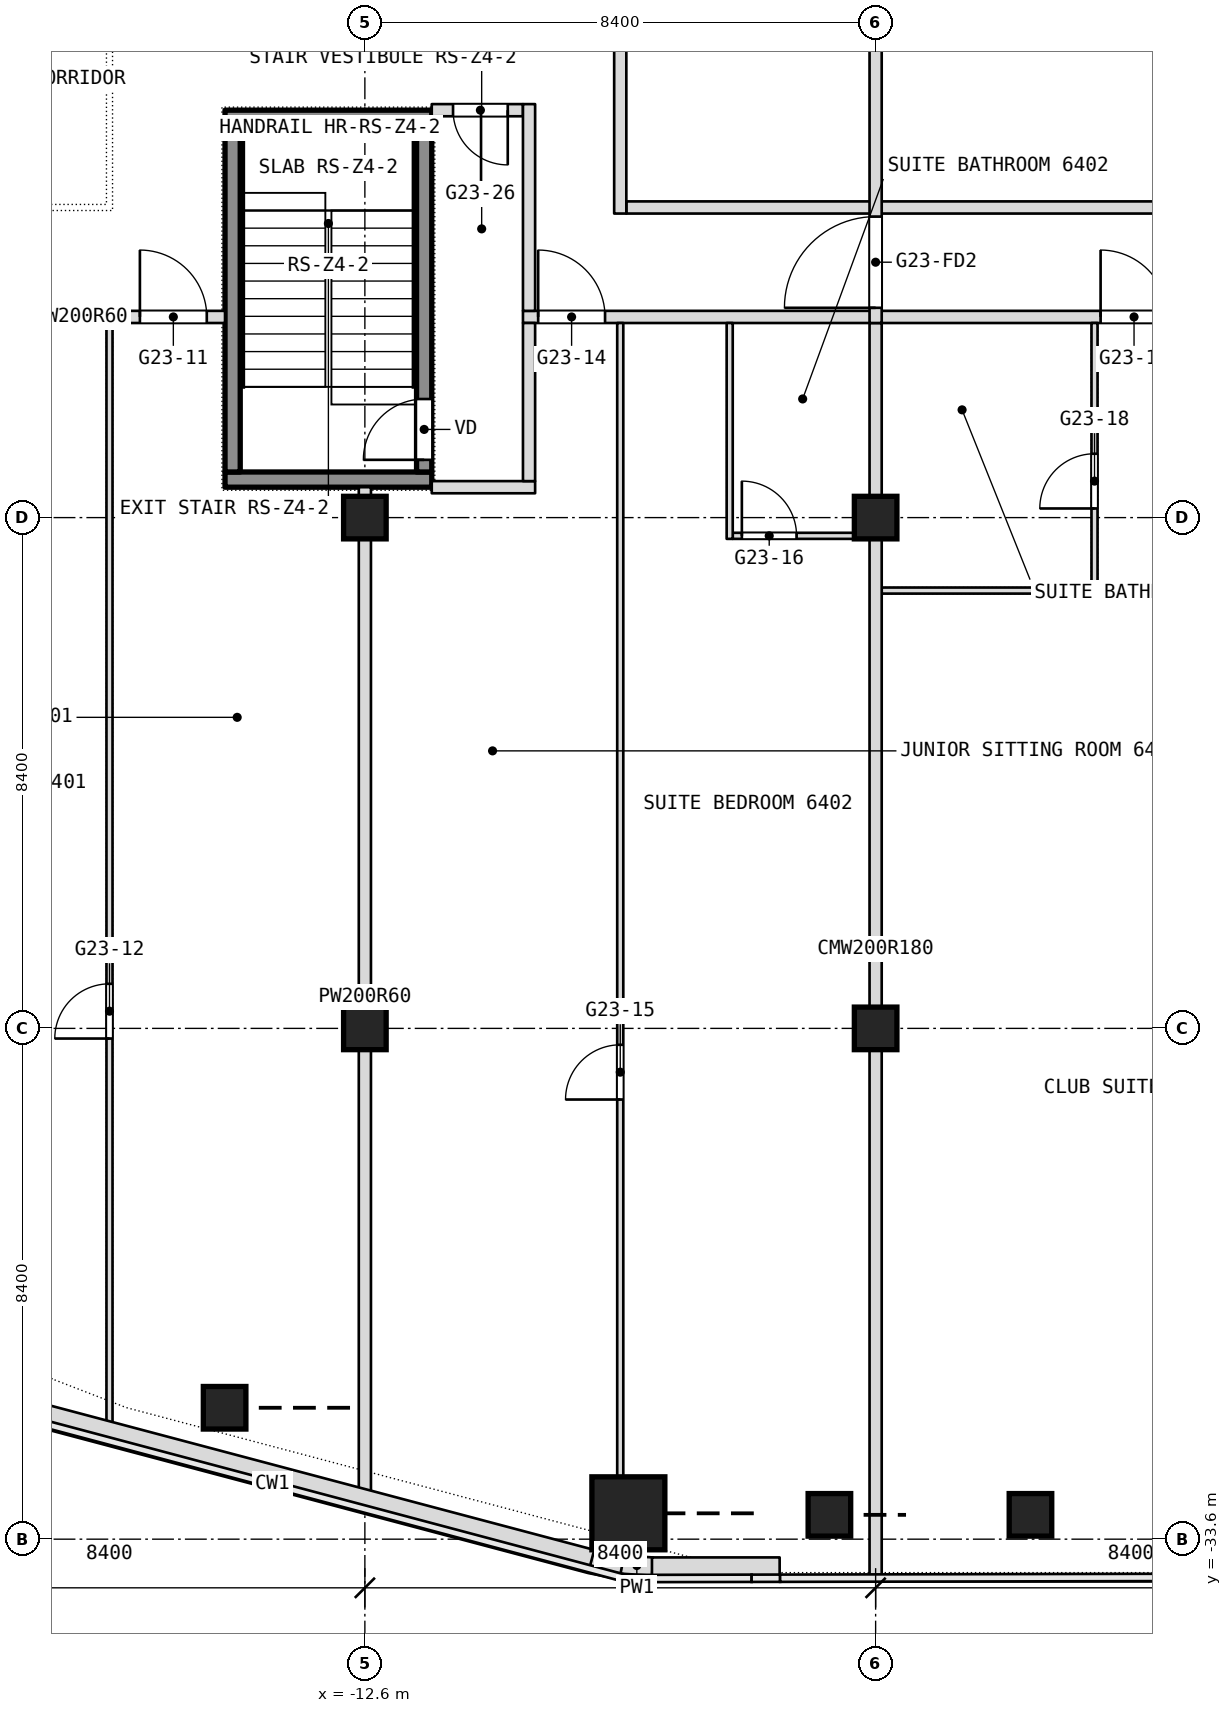
"""IFC4 building model, lengths in metres.
Left out: names, types, materials, properties, quantities, classifications, styles, units other than length and angle.
Written with IfcOpenShell. Run it as: python <this file> out.ifc"""

import sys

from ifc_helpers import new_model, si_unit, direction, frame, frame_2d, origin, origin_2d, place, context, subcontext, project, spatial, rectangle, i_section, extrude, element, fill, save


model = new_model("IFC4")
c1 = context("Model", 3, precision=1e-05, world=origin(), true_north=direction((0.0, 1.0)))
c2 = subcontext(c1, "Body", "Model", "MODEL_VIEW")
j1 = project(units=[si_unit("LENGTHUNIT", "METRE"), si_unit("PLANEANGLEUNIT", "RADIAN")], contexts=[c1])
p1 = place(None, origin())
s1 = spatial("IfcSite", under=j1, at=p1, CompositionType="ELEMENT")
p2 = place(p1, origin())
s2 = spatial("IfcBuilding", under=s1, at=p2, CompositionType="ELEMENT")
p3 = place(p2, frame((0.0, 0.0, 277.7)))
s3 = spatial("IfcBuildingStorey", under=s2, at=p3, CompositionType="ELEMENT", Elevation=277.7)
for number, where, z_axis, x_axis in (
    (1, (-12.6, -25.2, 0.0), (0.0, 0.0, 1.0), (1.0, 0.0, 0.0)),
    (2, (-12.6, -16.8, 0.0), (0.0, 0.0, 1.0), (1.0, 0.0, 0.0)),
    (3, (-4.2, -25.2, 0.0), (0.0, 0.0, 1.0), (1.0, 0.0, 0.0)),
    (4, (-4.2, -16.8, 0.0), (0.0, 0.0, 1.0), (1.0, 0.0, 0.0)),
):
    element("IfcColumn", number, at=place(p3, frame(where, z_axis=z_axis, x_axis=x_axis)), inside=s3, PredefinedType="COLUMN", context=c2, shape_type="SweptSolid", body=[
        extrude(rectangle(XDim=0.7, YDim=0.7, at=origin_2d()), origin(), (0.0, 0.0, 1.0), 3.6),
    ])
for number, where, z_axis, x_axis in (
    (5, (-8.679, -33.091, 0.0), (0.0, 0.0, 1.0), (1.0, 0.0, 0.0)),
    (6, (-14.907, -31.439, 0.0), (0.0, 0.0, 1.0), (1.0, 0.0, 0.0)),
):
    element("IfcColumn", number, at=place(p3, frame(where, z_axis=z_axis, x_axis=x_axis)), inside=s3, PredefinedType="COLUMN", context=c2, shape_type="SweptSolid", body=[
        extrude(i_section(OverallWidth=0.306, OverallDepth=0.524, WebThickness=0.024, FlangeThickness=0.04, FilletRadius=0.027, at=origin_2d()), origin(), (0.0, 0.0, 1.0), 2.94),
    ])
p4 = place(p3, frame((-4.1, -18.0, 0.0), z_axis=(0.0, 0.0, 1.0), x_axis=(1.0, 0.0, 0.0)))
e7 = element("IfcWall", 7, at=p4, inside=s3, PredefinedType="PARTITIONING", context=c2, shape_type="SweptSolid", body=[
    extrude(rectangle(XDim=3.55, YDim=0.1, at=frame_2d((1.775, 0.0))), origin(), (0.0, 0.0, 1.0), 3.34),
])
p5 = place(p3, frame((-6.55, -17.1, 0.0), z_axis=(0.0, 0.0, 1.0), x_axis=(1.0, 0.0, 0.0)))
e8 = element("IfcWall", 8, at=p5, inside=s3, PredefinedType="PARTITIONING", context=c2, shape_type="SweptSolid", body=[
    extrude(rectangle(XDim=2.45, YDim=0.1, at=frame_2d((1.225, 0.0))), origin(), (0.0, 0.0, 1.0), 3.34),
])
p6 = place(p5, frame((0.15, 0.0, 0.0)))
e9 = element("IfcOpeningElement", 9, at=p6, cuts=e8, PredefinedType="OPENING", context=c2, shape_type="SweptSolid", body=[
    extrude(rectangle(XDim=0.9, YDim=2.1, at=frame_2d((0.45, 1.05))), frame((0.0, 0.05, 0.0), z_axis=(0.0, -1.0, 0.0), x_axis=(1.0, 0.0, 0.0)), (0.0, 0.0, 1.0), 0.1),
])
p7 = place(p3, frame((-11.5, -16.3, 0.0), z_axis=(0.0, 0.0, 1.0), x_axis=(1.0, 0.0, 0.0)))
e10 = element("IfcWall", 10, at=p7, inside=s3, PredefinedType="PARTITIONING", context=c2, shape_type="SweptSolid", body=[
    extrude(rectangle(XDim=1.7, YDim=0.2, at=frame_2d((0.85, 0.0))), origin(), (0.0, 0.0, 1.0), 3.34),
])
p8 = place(p3, frame((-21.0, -13.5, 0.0), z_axis=(0.0, 0.0, 1.0), x_axis=(1.0, 0.0, 0.0)))
e11 = element("IfcWall", 11, at=p8, inside=s3, PredefinedType="PARTITIONING", context=c2, shape_type="SweptSolid", body=[
    extrude(rectangle(XDim=6.1, YDim=0.2, at=frame_2d((3.05, 0.0))), origin(), (0.0, 0.0, 1.0), 3.34),
])
p9 = place(p8, frame((4.7, 0.0, 0.0)))
e12 = element("IfcOpeningElement", 12, at=p9, cuts=e11, PredefinedType="OPENING", context=c2, shape_type="SweptSolid", body=[
    extrude(rectangle(XDim=1.1, YDim=2.1, at=frame_2d((0.55, 1.05))), frame((0.0, 0.1, 0.0), z_axis=(0.0, -1.0, 0.0), x_axis=(1.0, 0.0, 0.0)), (0.0, 0.0, 1.0), 0.2),
])
p10 = place(p3, frame((-10.0, -13.5, 0.0), z_axis=(0.0, 0.0, 1.0), x_axis=(1.0, 0.0, 0.0)))
e13 = element("IfcWall", 13, at=p10, inside=s3, PredefinedType="PARTITIONING", context=c2, shape_type="SweptSolid", body=[
    extrude(rectangle(XDim=16.0, YDim=0.2, at=frame_2d((8.0, 0.0))), origin(), (0.0, 0.0, 1.0), 3.34),
])
p11 = place(p10, frame((0.25, 0.0, 0.0)))
e14 = element("IfcOpeningElement", 14, at=p11, cuts=e13, PredefinedType="OPENING", context=c2, shape_type="SweptSolid", body=[
    extrude(rectangle(XDim=1.1, YDim=2.1, at=frame_2d((0.55, 1.05))), frame((0.0, 0.1, 0.0), z_axis=(0.0, -1.0, 0.0), x_axis=(1.0, 0.0, 0.0)), (0.0, 0.0, 1.0), 0.2),
])
p12 = place(p10, frame((9.5, 0.0, 0.0)))
e15 = element("IfcOpeningElement", 15, at=p12, cuts=e13, PredefinedType="OPENING", context=c2, shape_type="SweptSolid", body=[
    extrude(rectangle(XDim=1.1, YDim=2.1, at=frame_2d((0.55, 1.05))), frame((0.0, 0.1, 0.0), z_axis=(0.0, -1.0, 0.0), x_axis=(1.0, 0.0, 0.0)), (0.0, 0.0, 1.0), 0.2),
])
p13 = place(p3, frame((-8.3, -11.7, 0.0), z_axis=(0.0, 0.0, 1.0), x_axis=(1.0, 0.0, 0.0)))
e16 = element("IfcWall", 16, at=p13, inside=s3, PredefinedType="PARTITIONING", context=c2, shape_type="SweptSolid", body=[
    extrude(rectangle(XDim=25.0, YDim=0.2, at=frame_2d((12.5, 0.0))), origin(), (0.0, 0.0, 1.0), 3.34),
])
p14 = place(p3, frame((-11.5, -10.1, 0.0), z_axis=(0.0, 0.0, 1.0), x_axis=(1.0, 0.0, 0.0)))
e17 = element("IfcWall", 17, at=p14, inside=s3, PredefinedType="PARTITIONING", context=c2, shape_type="SweptSolid", body=[
    extrude(rectangle(XDim=1.5, YDim=0.2, at=frame_2d((0.75, 0.0))), origin(), (0.0, 0.0, 1.0), 3.34),
])
p15 = place(p14, frame((0.35, 0.0, 0.0)))
e18 = element("IfcOpeningElement", 18, at=p15, cuts=e17, PredefinedType="OPENING", context=c2, shape_type="SweptSolid", body=[
    extrude(rectangle(XDim=0.9, YDim=2.1, at=frame_2d((0.45, 1.05))), frame((0.0, 0.1, 0.0), z_axis=(0.0, -1.0, 0.0), x_axis=(1.0, 0.0, 0.0)), (0.0, 0.0, 1.0), 0.2),
])
p16 = place(p3, frame((-0.6, -17.95, 0.0), z_axis=(0.0, 0.0, 1.0), x_axis=(0.0, 1.0, 0.0)))
e19 = element("IfcWall", 19, at=p16, inside=s3, PredefinedType="PARTITIONING", context=c2, shape_type="SweptSolid", body=[
    extrude(rectangle(XDim=4.35, YDim=0.1, at=frame_2d((2.175, 0.0))), origin(), (0.0, 0.0, 1.0), 3.34),
])
p17 = place(p16, frame((1.3, 0.0, 0.0)))
e20 = element("IfcOpeningElement", 20, at=p17, cuts=e19, PredefinedType="OPENING", context=c2, shape_type="SweptSolid", body=[
    extrude(rectangle(XDim=0.9, YDim=2.1, at=frame_2d((0.45, 1.05))), frame((0.0, 0.05, 0.0), z_axis=(0.0, -1.0, 0.0), x_axis=(1.0, 0.0, 0.0)), (0.0, 0.0, 1.0), 0.1),
])
p18 = place(p3, frame((-4.2, -34.2, 0.0), z_axis=(0.0, 0.0, 1.0), x_axis=(0.0, 1.0, 0.0)))
e21 = element("IfcWall", 21, at=p18, inside=s3, PredefinedType="PARTITIONING", context=c2, shape_type="SweptSolid", body=[
    extrude(rectangle(XDim=20.6, YDim=0.2, at=frame_2d((10.3, 0.0))), origin(), (0.0, 0.0, 1.0), 3.34),
])
p19 = place(p3, frame((-4.2, -13.6, 0.0), z_axis=(0.0, 0.0, 1.0), x_axis=(0.0, 1.0, 0.0)))
e22 = element("IfcWall", 22, at=p19, inside=s3, PredefinedType="PARTITIONING", context=c2, shape_type="SweptSolid", body=[
    extrude(rectangle(XDim=13.6, YDim=0.2, at=frame_2d((6.8, 0.0))), origin(), (0.0, 0.0, 1.0), 3.34),
])
p20 = place(p19, frame((11.95, 0.0, 0.0)))
e23 = element("IfcOpeningElement", 23, at=p20, cuts=e22, PredefinedType="OPENING", context=c2, shape_type="SweptSolid", body=[
    extrude(rectangle(XDim=1.5, YDim=2.1, at=frame_2d((0.75, 1.05))), frame((0.0, 0.1, 0.0), z_axis=(0.0, -1.0, 0.0), x_axis=(1.0, 0.0, 0.0)), (0.0, 0.0, 1.0), 0.2),
])
p21 = place(p19, frame((0.25, 0.0, 0.0)))
e24 = element("IfcOpeningElement", 24, at=p21, cuts=e22, PredefinedType="OPENING", context=c2, shape_type="SweptSolid", body=[
    extrude(rectangle(XDim=1.5, YDim=2.1, at=frame_2d((0.75, 1.05))), frame((0.0, 0.1, 0.0), z_axis=(0.0, -1.0, 0.0), x_axis=(1.0, 0.0, 0.0)), (0.0, 0.0, 1.0), 0.2),
])
p22 = place(p3, frame((-6.6, -17.15, 0.0), z_axis=(0.0, 0.0, 1.0), x_axis=(0.0, 1.0, 0.0)))
e25 = element("IfcWall", 25, at=p22, inside=s3, PredefinedType="PARTITIONING", context=c2, shape_type="SweptSolid", body=[
    extrude(rectangle(XDim=3.55, YDim=0.1, at=frame_2d((1.775, 0.0))), origin(), (0.0, 0.0, 1.0), 3.34),
])
p23 = place(p3, frame((-8.4, -34.192, 0.0), z_axis=(0.0, 0.0, 1.0), x_axis=(0.0, 1.0, 0.0)))
e26 = element("IfcWall", 26, at=p23, inside=s3, PredefinedType="PARTITIONING", context=c2, shape_type="SweptSolid", body=[
    extrude(rectangle(XDim=20.592, YDim=0.1, at=frame_2d((10.296, 0.0))), origin(), (0.0, 0.0, 1.0), 3.34),
])
p24 = place(p23, frame((7.822, 0.0, 0.0)))
e27 = element("IfcOpeningElement", 27, at=p24, cuts=e26, PredefinedType="OPENING", context=c2, shape_type="SweptSolid", body=[
    extrude(rectangle(XDim=0.9, YDim=2.1, at=frame_2d((0.45, 1.05))), frame((0.0, 0.05, 0.0), z_axis=(0.0, -1.0, 0.0), x_axis=(1.0, 0.0, 0.0)), (0.0, 0.0, 1.0), 0.1),
])
p25 = place(p3, frame((-8.4, -11.8, 0.0), z_axis=(0.0, 0.0, 1.0), x_axis=(0.0, 1.0, 0.0)))
e28 = element("IfcWall", 28, at=p25, inside=s3, PredefinedType="PARTITIONING", context=c2, shape_type="SweptSolid", body=[
    extrude(rectangle(XDim=3.1, YDim=0.2, at=frame_2d((1.55, 0.0))), origin(), (0.0, 0.0, 1.0), 3.34),
])
p26 = place(p3, frame((-9.9, -16.2, 0.0), z_axis=(0.0, 0.0, 1.0), x_axis=(0.0, 1.0, 0.0)))
e29 = element("IfcWall", 29, at=p26, inside=s3, PredefinedType="PARTITIONING", context=c2, shape_type="SweptSolid", body=[
    extrude(rectangle(XDim=2.6, YDim=0.2, at=frame_2d((1.3, 0.0))), origin(), (0.0, 0.0, 1.0), 3.34),
])
p27 = place(p3, frame((-9.9, -13.4, 0.0), z_axis=(0.0, 0.0, 1.0), x_axis=(0.0, 1.0, 0.0)))
e30 = element("IfcWall", 30, at=p27, inside=s3, PredefinedType="PARTITIONING", context=c2, shape_type="SweptSolid", body=[
    extrude(rectangle(XDim=3.4, YDim=0.2, at=frame_2d((1.7, 0.0))), origin(), (0.0, 0.0, 1.0), 3.34),
])
p28 = place(p3, frame((-12.6, -33.075, 0.0), z_axis=(0.0, 0.0, 1.0), x_axis=(0.0, 1.0, 0.0)))
e31 = element("IfcWall", 31, at=p28, inside=s3, PredefinedType="PARTITIONING", context=c2, shape_type="SweptSolid", body=[
    extrude(rectangle(XDim=16.775, YDim=0.2, at=frame_2d((8.387, 0.0))), origin(), (0.0, 0.0, 1.0), 3.34),
])
p29 = place(p3, frame((-16.8, -31.957, 0.0), z_axis=(0.0, 0.0, 1.0), x_axis=(0.0, 1.0, 0.0)))
e32 = element("IfcWall", 32, at=p29, inside=s3, PredefinedType="PARTITIONING", context=c2, shape_type="SweptSolid", body=[
    extrude(rectangle(XDim=18.357, YDim=0.1, at=frame_2d((9.178, 0.0))), origin(), (0.0, 0.0, 1.0), 3.34),
])
p30 = place(p29, frame((6.59, 0.0, 0.0)))
e33 = element("IfcOpeningElement", 33, at=p30, cuts=e32, PredefinedType="OPENING", context=c2, shape_type="SweptSolid", body=[
    extrude(rectangle(XDim=0.9, YDim=2.1, at=frame_2d((0.45, 1.05))), frame((0.0, 0.05, 0.0), z_axis=(0.0, -1.0, 0.0), x_axis=(1.0, 0.0, 0.0)), (0.0, 0.0, 1.0), 0.1),
])
p31 = place(p3, frame((-7.869, -34.05, 3.6), z_axis=(0.0, 0.0, 1.0), x_axis=(-0.997886085242, 0.064987390167, 0.0)))
e34 = element("IfcWall", 34, at=p31, inside=s3, PredefinedType="PARAPET", context=c2, shape_type="SweptSolid", body=[
    extrude(rectangle(XDim=0.518, YDim=0.3, at=frame_2d((0.259, 0.0))), origin(), (0.0, 0.0, 1.0), 1.1),
])
p32 = place(p3, frame((-8.367, -34.019, 3.6), z_axis=(0.0, 0.0, 1.0), x_axis=(-0.981066960595, 0.193668838043, 0.0)))
e35 = element("IfcWall", 35, at=p32, inside=s3, PredefinedType="PARAPET", context=c2, shape_type="SweptSolid", body=[
    extrude(rectangle(XDim=0.518, YDim=0.3, at=frame_2d((0.259, 0.0))), origin(), (0.0, 0.0, 1.0), 1.1),
])
p33 = place(p3, frame((-8.865, -33.921, 3.6), z_axis=(0.0, 0.0, 1.0), x_axis=(-0.966564868529, 0.256422220031, 0.0)))
e36 = element("IfcWall", 36, at=p33, inside=s3, PredefinedType="PARAPET", context=c2, shape_type="SweptSolid", body=[
    extrude(rectangle(XDim=10.071, YDim=0.3, at=frame_2d((5.036, 0.0))), origin(), (0.0, 0.0, 1.0), 1.1),
])
p34 = place(p3, frame((-5.778, -34.05, 3.6), z_axis=(0.0, 0.0, 1.0), x_axis=(-1.0, 0.0, 0.0)))
e37 = element("IfcWall", 37, at=p34, inside=s3, PredefinedType="PARAPET", context=c2, shape_type="SweptSolid", body=[
    extrude(rectangle(XDim=2.1, YDim=0.3, at=frame_2d((1.05, 0.0))), origin(), (0.0, 0.0, 1.0), 1.1),
])
for number, where, z_axis, x_axis in (
    (38, (-14.9, -16.175, 0.1), (0.0, 0.0, 1.0), (1.0, 0.0, 0.0)),
    (39, (-14.9, -10.225, 0.1), (0.0, 0.0, 1.0), (1.0, 0.0, 0.0)),
):
    element("IfcWall", number, at=place(p3, frame(where, z_axis=z_axis, x_axis=x_axis)), inside=s3, PredefinedType="SHEAR", context=c2, shape_type="SweptSolid", body=[
        extrude(rectangle(XDim=3.4, YDim=0.25, at=frame_2d((1.7, 0.0))), origin(), (0.0, 0.0, 1.0), 3.6),
    ])
p35 = place(p3, frame((-14.775, -16.05, 0.1), z_axis=(0.0, 0.0, 1.0), x_axis=(0.0, 1.0, 0.0)))
e40 = element("IfcWall", 40, at=p35, inside=s3, PredefinedType="SHEAR", context=c2, shape_type="SweptSolid", body=[
    extrude(rectangle(XDim=5.7, YDim=0.25, at=frame_2d((2.85, 0.0))), origin(), (0.0, 0.0, 1.0), 3.6),
])
p36 = place(p3, frame((-11.625, -16.05, 0.1), z_axis=(0.0, 0.0, 1.0), x_axis=(0.0, 1.0, 0.0)))
e41 = element("IfcWall", 41, at=p36, inside=s3, PredefinedType="SHEAR", context=c2, shape_type="SweptSolid", body=[
    extrude(rectangle(XDim=5.7, YDim=0.25, at=frame_2d((2.85, 0.0))), origin(), (0.0, 0.0, 1.0), 3.6),
])
p37 = place(p36, frame((0.2, 0.0, 0.0)))
e42 = element("IfcOpeningElement", 42, at=p37, cuts=e41, PredefinedType="OPENING", context=c2, shape_type="SweptSolid", body=[
    extrude(rectangle(XDim=1.0, YDim=2.1, at=frame_2d((0.5, 1.05))), frame((0.0, 0.125, 0.0), z_axis=(0.0, -1.0, 0.0), x_axis=(1.0, 0.0, 0.0)), (0.0, 0.0, 1.0), 0.25),
])
p38 = place(p9, origin())
e43 = element("IfcDoor", 43, at=p38, inside=s3, OperationType="SINGLE_SWING_RIGHT", PredefinedType="DOOR", context=c2, shape_type="SweptSolid", body=[
    extrude(rectangle(XDim=1.1, YDim=2.1, at=frame_2d((0.55, 1.05))), frame((0.0, 0.025, 0.0), z_axis=(0.0, -1.0, 0.0), x_axis=(1.0, 0.0, 0.0)), (0.0, 0.0, 1.0), 0.05),
])
fill(e12, e43)
p39 = place(p30, origin())
e44 = element("IfcDoor", 44, at=p39, inside=s3, OperationType="SINGLE_SWING_LEFT", PredefinedType="DOOR", context=c2, shape_type="SweptSolid", body=[
    extrude(rectangle(XDim=0.9, YDim=2.1, at=frame_2d((0.45, 1.05))), frame((0.0, 0.025, 0.0), z_axis=(0.0, -1.0, 0.0), x_axis=(1.0, 0.0, 0.0)), (0.0, 0.0, 1.0), 0.05),
])
fill(e33, e44)
p40 = place(p11, origin())
e45 = element("IfcDoor", 45, at=p40, inside=s3, OperationType="SINGLE_SWING_RIGHT", PredefinedType="DOOR", context=c2, shape_type="SweptSolid", body=[
    extrude(rectangle(XDim=1.1, YDim=2.1, at=frame_2d((0.55, 1.05))), frame((0.0, 0.025, 0.0), z_axis=(0.0, -1.0, 0.0), x_axis=(1.0, 0.0, 0.0)), (0.0, 0.0, 1.0), 0.05),
])
fill(e14, e45)
p41 = place(p24, origin())
e46 = element("IfcDoor", 46, at=p41, inside=s3, OperationType="SINGLE_SWING_LEFT", PredefinedType="DOOR", context=c2, shape_type="SweptSolid", body=[
    extrude(rectangle(XDim=0.9, YDim=2.1, at=frame_2d((0.45, 1.05))), frame((0.0, 0.025, 0.0), z_axis=(0.0, -1.0, 0.0), x_axis=(1.0, 0.0, 0.0)), (0.0, 0.0, 1.0), 0.05),
])
fill(e27, e46)
p42 = place(p6, origin())
e47 = element("IfcDoor", 47, at=p42, inside=s3, OperationType="SINGLE_SWING_LEFT", PredefinedType="DOOR", context=c2, shape_type="SweptSolid", body=[
    extrude(rectangle(XDim=0.9, YDim=2.1, at=frame_2d((0.45, 1.05))), frame((0.0, 0.025, 0.0), z_axis=(0.0, -1.0, 0.0), x_axis=(1.0, 0.0, 0.0)), (0.0, 0.0, 1.0), 0.05),
])
fill(e9, e47)
p43 = place(p12, origin())
e48 = element("IfcDoor", 48, at=p43, inside=s3, OperationType="SINGLE_SWING_RIGHT", PredefinedType="DOOR", context=c2, shape_type="SweptSolid", body=[
    extrude(rectangle(XDim=1.1, YDim=2.1, at=frame_2d((0.55, 1.05))), frame((0.0, 0.025, 0.0), z_axis=(0.0, -1.0, 0.0), x_axis=(1.0, 0.0, 0.0)), (0.0, 0.0, 1.0), 0.05),
])
fill(e15, e48)
p44 = place(p17, origin())
e49 = element("IfcDoor", 49, at=p44, inside=s3, OperationType="SINGLE_SWING_LEFT", PredefinedType="DOOR", context=c2, shape_type="SweptSolid", body=[
    extrude(rectangle(XDim=0.9, YDim=2.1, at=frame_2d((0.45, 1.05))), frame((0.0, 0.025, 0.0), z_axis=(0.0, -1.0, 0.0), x_axis=(1.0, 0.0, 0.0)), (0.0, 0.0, 1.0), 0.05),
])
fill(e20, e49)
p45 = place(p15, origin())
e50 = element("IfcDoor", 50, at=p45, inside=s3, OperationType="SINGLE_SWING_LEFT", PredefinedType="DOOR", context=c2, shape_type="SweptSolid", body=[
    extrude(rectangle(XDim=0.9, YDim=2.1, at=frame_2d((0.45, 1.05))), frame((0.0, 0.025, 0.0), z_axis=(0.0, -1.0, 0.0), x_axis=(1.0, 0.0, 0.0)), (0.0, 0.0, 1.0), 0.05),
])
fill(e18, e50)
p46 = place(p37, origin())
e51 = element("IfcDoor", 51, at=p46, inside=s3, OperationType="SINGLE_SWING_LEFT", PredefinedType="DOOR", context=c2, shape_type="SweptSolid", body=[
    extrude(rectangle(XDim=1.0, YDim=2.1, at=frame_2d((0.5, 1.05))), frame((0.0, 0.025, 0.0), z_axis=(0.0, -1.0, 0.0), x_axis=(1.0, 0.0, 0.0)), (0.0, 0.0, 1.0), 0.05),
])
fill(e42, e51)
p47 = place(p21, origin())
e52 = element("IfcDoor", 52, at=p47, inside=s3, OperationType="DOUBLE_DOOR_DOUBLE_SWING", PredefinedType="DOOR", context=c2, shape_type="SweptSolid", body=[
    extrude(rectangle(XDim=1.5, YDim=2.1, at=frame_2d((0.75, 1.05))), frame((0.0, 0.025, 0.0), z_axis=(0.0, -1.0, 0.0), x_axis=(1.0, 0.0, 0.0)), (0.0, 0.0, 1.0), 0.05),
])
fill(e24, e52)
save(model, sys.argv[1])
